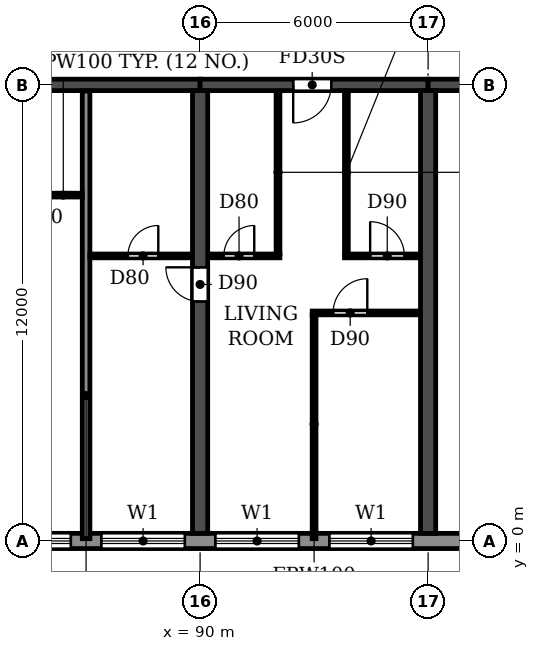
"""IFC4 building model, lengths in metres.
Left out: names, types, materials, properties, quantities, classifications, styles, units other than length and angle.
Written with IfcOpenShell. Run it as: python <this file> out.ifc"""

import sys

from ifc_helpers import new_model, si_unit, direction, frame, frame_2d, origin, place, context, subcontext, project, spatial, rectangle, extrude, element, fill, save


model = new_model("IFC4")
c1 = context("Model", 3, precision=1e-05, world=origin(), true_north=direction((0.0, 1.0)))
c2 = subcontext(c1, "Body", "Model", "MODEL_VIEW")
j1 = project(units=[si_unit("LENGTHUNIT", "METRE"), si_unit("PLANEANGLEUNIT", "RADIAN")], contexts=[c1])
p1 = place(None, origin())
s1 = spatial("IfcSite", under=j1, at=p1, CompositionType="ELEMENT")
p2 = place(p1, origin())
s2 = spatial("IfcBuilding", under=s1, at=p2, CompositionType="ELEMENT")
p3 = place(p2, frame((0.0, 0.0, 23.4)))
s3 = spatial("IfcBuildingStorey", under=s2, at=p3, CompositionType="ELEMENT", Elevation=23.4)
p4 = place(p3, frame((90.0, 0.2, 0.0), z_axis=(0.0, 0.0, 1.0), x_axis=(0.0, 1.0, 0.0)))
e1 = element("IfcWall", 1, at=p4, inside=s3, PredefinedType="SHEAR", context=c2, shape_type="SweptSolid", body=[
    extrude(rectangle(XDim=11.65, YDim=0.4, at=frame_2d((5.825, 0.0))), origin(), (0.0, 0.0, 1.0), 3.05),
])
p5 = place(p4, frame((6.1, 0.0, 0.0)))
e2 = element("IfcOpeningElement", 2, at=p5, cuts=e1, PredefinedType="OPENING", context=c2, shape_type="SweptSolid", body=[
    extrude(rectangle(XDim=0.9, YDim=2.1, at=frame_2d((0.45, 1.05))), frame((0.0, 0.21, 0.0), z_axis=(0.0, -1.0, 0.0), x_axis=(1.0, 0.0, 0.0)), (0.0, 0.0, 1.0), 0.42),
])
p6 = place(p3, frame((96.0, 0.2, 0.0), z_axis=(0.0, 0.0, 1.0), x_axis=(0.0, 1.0, 0.0)))
e3 = element("IfcWall", 3, at=p6, inside=s3, PredefinedType="SHEAR", context=c2, shape_type="SweptSolid", body=[
    extrude(rectangle(XDim=11.65, YDim=0.4, at=frame_2d((5.825, 0.0))), origin(), (0.0, 0.0, 1.0), 3.05),
])
p7 = place(p3, frame((84.0, 12.0, 0.0), z_axis=(0.0, 0.0, 1.0), x_axis=(1.0, 0.0, 0.0)))
e4 = element("IfcWall", 4, at=p7, inside=s3, PredefinedType="SHEAR", context=c2, shape_type="SweptSolid", body=[
    extrude(rectangle(XDim=6.0, YDim=0.3, at=frame_2d((3.0, 0.0))), origin(), (0.0, 0.0, 1.0), 2.45),
])
p8 = place(p3, frame((90.0, 12.0, 0.0), z_axis=(0.0, 0.0, 1.0), x_axis=(1.0, 0.0, 0.0)))
e5 = element("IfcWall", 5, at=p8, inside=s3, PredefinedType="SHEAR", context=c2, shape_type="SweptSolid", body=[
    extrude(rectangle(XDim=6.0, YDim=0.3, at=frame_2d((3.0, 0.0))), origin(), (0.0, 0.0, 1.0), 2.45),
])
p9 = place(p8, frame((2.45, 0.0, 0.0)))
e6 = element("IfcOpeningElement", 6, at=p9, cuts=e5, PredefinedType="OPENING", context=c2, shape_type="SweptSolid", body=[
    extrude(rectangle(XDim=1.0, YDim=2.1, at=frame_2d((0.5, 1.05))), frame((0.0, 0.16, 0.0), z_axis=(0.0, -1.0, 0.0), x_axis=(1.0, 0.0, 0.0)), (0.0, 0.0, 1.0), 0.32),
])
p10 = place(p3, frame((96.0, 12.0, 0.0), z_axis=(0.0, 0.0, 1.0), x_axis=(1.0, 0.0, 0.0)))
e7 = element("IfcWall", 7, at=p10, inside=s3, PredefinedType="SHEAR", context=c2, shape_type="SweptSolid", body=[
    extrude(rectangle(XDim=5.8, YDim=0.3, at=frame_2d((2.9, 0.0))), origin(), (0.0, 0.0, 1.0), 2.45),
])
p11 = place(p10, frame((2.5, 0.0, 0.0)))
e8 = element("IfcOpeningElement", 8, at=p11, cuts=e7, PredefinedType="OPENING", context=c2, shape_type="SweptSolid", body=[
    extrude(rectangle(XDim=1.0, YDim=2.1, at=frame_2d((0.5, 1.05))), frame((0.0, 0.16, 0.0), z_axis=(0.0, -1.0, 0.0), x_axis=(1.0, 0.0, 0.0)), (0.0, 0.0, 1.0), 0.32),
])
p12 = place(p3, frame((4.683, 0.0, 0.0), z_axis=(0.0, 0.0, 1.0), x_axis=(1.0, 0.0, 0.0)))
e9 = element("IfcWall", 9, at=p12, inside=s3, PredefinedType="STANDARD", context=c2, shape_type="SweptSolid", body=[
    extrude(rectangle(XDim=92.634, YDim=0.4, at=frame_2d((46.317, 0.0))), origin(), (0.0, 0.0, 1.0), 3.05),
])
p13 = place(p12, frame((1.717, 0.0, 0.9)))
e10 = element("IfcOpeningElement", 10, at=p13, cuts=e9, PredefinedType="OPENING", context=c2, shape_type="SweptSolid", body=[
    extrude(rectangle(XDim=2.2, YDim=1.5, at=frame_2d((1.1, 0.75))), frame((0.0, 0.21, 0.0), z_axis=(0.0, -1.0, 0.0), x_axis=(1.0, 0.0, 0.0)), (0.0, 0.0, 1.0), 0.42),
])
p14 = place(p12, frame((4.717, 0.0, 0.9)))
e11 = element("IfcOpeningElement", 11, at=p14, cuts=e9, PredefinedType="OPENING", context=c2, shape_type="SweptSolid", body=[
    extrude(rectangle(XDim=2.2, YDim=1.5, at=frame_2d((1.1, 0.75))), frame((0.0, 0.21, 0.0), z_axis=(0.0, -1.0, 0.0), x_axis=(1.0, 0.0, 0.0)), (0.0, 0.0, 1.0), 0.42),
])
p15 = place(p12, frame((7.717, 0.0, 0.9)))
e12 = element("IfcOpeningElement", 12, at=p15, cuts=e9, PredefinedType="OPENING", context=c2, shape_type="SweptSolid", body=[
    extrude(rectangle(XDim=2.2, YDim=1.5, at=frame_2d((1.1, 0.75))), frame((0.0, 0.21, 0.0), z_axis=(0.0, -1.0, 0.0), x_axis=(1.0, 0.0, 0.0)), (0.0, 0.0, 1.0), 0.42),
])
p16 = place(p12, frame((10.717, 0.0, 0.9)))
e13 = element("IfcOpeningElement", 13, at=p16, cuts=e9, PredefinedType="OPENING", context=c2, shape_type="SweptSolid", body=[
    extrude(rectangle(XDim=2.2, YDim=1.5, at=frame_2d((1.1, 0.75))), frame((0.0, 0.21, 0.0), z_axis=(0.0, -1.0, 0.0), x_axis=(1.0, 0.0, 0.0)), (0.0, 0.0, 1.0), 0.42),
])
p17 = place(p12, frame((13.717, 0.0, 0.9)))
e14 = element("IfcOpeningElement", 14, at=p17, cuts=e9, PredefinedType="OPENING", context=c2, shape_type="SweptSolid", body=[
    extrude(rectangle(XDim=2.2, YDim=1.5, at=frame_2d((1.1, 0.75))), frame((0.0, 0.21, 0.0), z_axis=(0.0, -1.0, 0.0), x_axis=(1.0, 0.0, 0.0)), (0.0, 0.0, 1.0), 0.42),
])
p18 = place(p12, frame((16.717, 0.0, 0.9)))
e15 = element("IfcOpeningElement", 15, at=p18, cuts=e9, PredefinedType="OPENING", context=c2, shape_type="SweptSolid", body=[
    extrude(rectangle(XDim=2.2, YDim=1.5, at=frame_2d((1.1, 0.75))), frame((0.0, 0.21, 0.0), z_axis=(0.0, -1.0, 0.0), x_axis=(1.0, 0.0, 0.0)), (0.0, 0.0, 1.0), 0.42),
])
p19 = place(p12, frame((19.917, 0.0, 0.0)))
e16 = element("IfcOpeningElement", 16, at=p19, cuts=e9, PredefinedType="OPENING", context=c2, shape_type="SweptSolid", body=[
    extrude(rectangle(XDim=1.8, YDim=2.4, at=frame_2d((0.9, 1.2))), frame((0.0, 0.21, 0.0), z_axis=(0.0, -1.0, 0.0), x_axis=(1.0, 0.0, 0.0)), (0.0, 0.0, 1.0), 0.42),
])
p20 = place(p12, frame((22.717, 0.0, 0.9)))
e17 = element("IfcOpeningElement", 17, at=p20, cuts=e9, PredefinedType="OPENING", context=c2, shape_type="SweptSolid", body=[
    extrude(rectangle(XDim=2.2, YDim=1.5, at=frame_2d((1.1, 0.75))), frame((0.0, 0.21, 0.0), z_axis=(0.0, -1.0, 0.0), x_axis=(1.0, 0.0, 0.0)), (0.0, 0.0, 1.0), 0.42),
])
p21 = place(p12, frame((25.717, 0.0, 0.9)))
e18 = element("IfcOpeningElement", 18, at=p21, cuts=e9, PredefinedType="OPENING", context=c2, shape_type="SweptSolid", body=[
    extrude(rectangle(XDim=2.2, YDim=1.5, at=frame_2d((1.1, 0.75))), frame((0.0, 0.21, 0.0), z_axis=(0.0, -1.0, 0.0), x_axis=(1.0, 0.0, 0.0)), (0.0, 0.0, 1.0), 0.42),
])
p22 = place(p12, frame((28.717, 0.0, 0.9)))
e19 = element("IfcOpeningElement", 19, at=p22, cuts=e9, PredefinedType="OPENING", context=c2, shape_type="SweptSolid", body=[
    extrude(rectangle(XDim=2.2, YDim=1.5, at=frame_2d((1.1, 0.75))), frame((0.0, 0.21, 0.0), z_axis=(0.0, -1.0, 0.0), x_axis=(1.0, 0.0, 0.0)), (0.0, 0.0, 1.0), 0.42),
])
p23 = place(p12, frame((31.917, 0.0, 0.0)))
e20 = element("IfcOpeningElement", 20, at=p23, cuts=e9, PredefinedType="OPENING", context=c2, shape_type="SweptSolid", body=[
    extrude(rectangle(XDim=1.8, YDim=2.4, at=frame_2d((0.9, 1.2))), frame((0.0, 0.21, 0.0), z_axis=(0.0, -1.0, 0.0), x_axis=(1.0, 0.0, 0.0)), (0.0, 0.0, 1.0), 0.42),
])
p24 = place(p12, frame((34.717, 0.0, 0.9)))
e21 = element("IfcOpeningElement", 21, at=p24, cuts=e9, PredefinedType="OPENING", context=c2, shape_type="SweptSolid", body=[
    extrude(rectangle(XDim=2.2, YDim=1.5, at=frame_2d((1.1, 0.75))), frame((0.0, 0.21, 0.0), z_axis=(0.0, -1.0, 0.0), x_axis=(1.0, 0.0, 0.0)), (0.0, 0.0, 1.0), 0.42),
])
p25 = place(p12, frame((37.717, 0.0, 0.9)))
e22 = element("IfcOpeningElement", 22, at=p25, cuts=e9, PredefinedType="OPENING", context=c2, shape_type="SweptSolid", body=[
    extrude(rectangle(XDim=2.2, YDim=1.5, at=frame_2d((1.1, 0.75))), frame((0.0, 0.21, 0.0), z_axis=(0.0, -1.0, 0.0), x_axis=(1.0, 0.0, 0.0)), (0.0, 0.0, 1.0), 0.42),
])
p26 = place(p12, frame((40.717, 0.0, 0.9)))
e23 = element("IfcOpeningElement", 23, at=p26, cuts=e9, PredefinedType="OPENING", context=c2, shape_type="SweptSolid", body=[
    extrude(rectangle(XDim=2.2, YDim=1.5, at=frame_2d((1.1, 0.75))), frame((0.0, 0.21, 0.0), z_axis=(0.0, -1.0, 0.0), x_axis=(1.0, 0.0, 0.0)), (0.0, 0.0, 1.0), 0.42),
])
p27 = place(p12, frame((43.917, 0.0, 0.0)))
e24 = element("IfcOpeningElement", 24, at=p27, cuts=e9, PredefinedType="OPENING", context=c2, shape_type="SweptSolid", body=[
    extrude(rectangle(XDim=1.8, YDim=2.4, at=frame_2d((0.9, 1.2))), frame((0.0, 0.21, 0.0), z_axis=(0.0, -1.0, 0.0), x_axis=(1.0, 0.0, 0.0)), (0.0, 0.0, 1.0), 0.42),
])
p28 = place(p12, frame((46.717, 0.0, 0.9)))
e25 = element("IfcOpeningElement", 25, at=p28, cuts=e9, PredefinedType="OPENING", context=c2, shape_type="SweptSolid", body=[
    extrude(rectangle(XDim=2.2, YDim=1.5, at=frame_2d((1.1, 0.75))), frame((0.0, 0.21, 0.0), z_axis=(0.0, -1.0, 0.0), x_axis=(1.0, 0.0, 0.0)), (0.0, 0.0, 1.0), 0.42),
])
p29 = place(p12, frame((49.717, 0.0, 0.9)))
e26 = element("IfcOpeningElement", 26, at=p29, cuts=e9, PredefinedType="OPENING", context=c2, shape_type="SweptSolid", body=[
    extrude(rectangle(XDim=2.2, YDim=1.5, at=frame_2d((1.1, 0.75))), frame((0.0, 0.21, 0.0), z_axis=(0.0, -1.0, 0.0), x_axis=(1.0, 0.0, 0.0)), (0.0, 0.0, 1.0), 0.42),
])
p30 = place(p12, frame((52.717, 0.0, 0.9)))
e27 = element("IfcOpeningElement", 27, at=p30, cuts=e9, PredefinedType="OPENING", context=c2, shape_type="SweptSolid", body=[
    extrude(rectangle(XDim=2.2, YDim=1.5, at=frame_2d((1.1, 0.75))), frame((0.0, 0.21, 0.0), z_axis=(0.0, -1.0, 0.0), x_axis=(1.0, 0.0, 0.0)), (0.0, 0.0, 1.0), 0.42),
])
p31 = place(p12, frame((55.717, 0.0, 0.9)))
e28 = element("IfcOpeningElement", 28, at=p31, cuts=e9, PredefinedType="OPENING", context=c2, shape_type="SweptSolid", body=[
    extrude(rectangle(XDim=2.2, YDim=1.5, at=frame_2d((1.1, 0.75))), frame((0.0, 0.21, 0.0), z_axis=(0.0, -1.0, 0.0), x_axis=(1.0, 0.0, 0.0)), (0.0, 0.0, 1.0), 0.42),
])
p32 = place(p12, frame((58.917, 0.0, 0.0)))
e29 = element("IfcOpeningElement", 29, at=p32, cuts=e9, PredefinedType="OPENING", context=c2, shape_type="SweptSolid", body=[
    extrude(rectangle(XDim=1.8, YDim=2.4, at=frame_2d((0.9, 1.2))), frame((0.0, 0.21, 0.0), z_axis=(0.0, -1.0, 0.0), x_axis=(1.0, 0.0, 0.0)), (0.0, 0.0, 1.0), 0.42),
])
p33 = place(p12, frame((61.717, 0.0, 0.9)))
e30 = element("IfcOpeningElement", 30, at=p33, cuts=e9, PredefinedType="OPENING", context=c2, shape_type="SweptSolid", body=[
    extrude(rectangle(XDim=2.2, YDim=1.5, at=frame_2d((1.1, 0.75))), frame((0.0, 0.21, 0.0), z_axis=(0.0, -1.0, 0.0), x_axis=(1.0, 0.0, 0.0)), (0.0, 0.0, 1.0), 0.42),
])
p34 = place(p12, frame((64.717, 0.0, 0.9)))
e31 = element("IfcOpeningElement", 31, at=p34, cuts=e9, PredefinedType="OPENING", context=c2, shape_type="SweptSolid", body=[
    extrude(rectangle(XDim=2.2, YDim=1.5, at=frame_2d((1.1, 0.75))), frame((0.0, 0.21, 0.0), z_axis=(0.0, -1.0, 0.0), x_axis=(1.0, 0.0, 0.0)), (0.0, 0.0, 1.0), 0.42),
])
p35 = place(p12, frame((67.717, 0.0, 0.9)))
e32 = element("IfcOpeningElement", 32, at=p35, cuts=e9, PredefinedType="OPENING", context=c2, shape_type="SweptSolid", body=[
    extrude(rectangle(XDim=2.2, YDim=1.5, at=frame_2d((1.1, 0.75))), frame((0.0, 0.21, 0.0), z_axis=(0.0, -1.0, 0.0), x_axis=(1.0, 0.0, 0.0)), (0.0, 0.0, 1.0), 0.42),
])
p36 = place(p12, frame((70.917, 0.0, 0.0)))
e33 = element("IfcOpeningElement", 33, at=p36, cuts=e9, PredefinedType="OPENING", context=c2, shape_type="SweptSolid", body=[
    extrude(rectangle(XDim=1.8, YDim=2.4, at=frame_2d((0.9, 1.2))), frame((0.0, 0.21, 0.0), z_axis=(0.0, -1.0, 0.0), x_axis=(1.0, 0.0, 0.0)), (0.0, 0.0, 1.0), 0.42),
])
p37 = place(p12, frame((73.717, 0.0, 0.9)))
e34 = element("IfcOpeningElement", 34, at=p37, cuts=e9, PredefinedType="OPENING", context=c2, shape_type="SweptSolid", body=[
    extrude(rectangle(XDim=2.2, YDim=1.5, at=frame_2d((1.1, 0.75))), frame((0.0, 0.21, 0.0), z_axis=(0.0, -1.0, 0.0), x_axis=(1.0, 0.0, 0.0)), (0.0, 0.0, 1.0), 0.42),
])
p38 = place(p12, frame((76.717, 0.0, 0.9)))
e35 = element("IfcOpeningElement", 35, at=p38, cuts=e9, PredefinedType="OPENING", context=c2, shape_type="SweptSolid", body=[
    extrude(rectangle(XDim=2.2, YDim=1.5, at=frame_2d((1.1, 0.75))), frame((0.0, 0.21, 0.0), z_axis=(0.0, -1.0, 0.0), x_axis=(1.0, 0.0, 0.0)), (0.0, 0.0, 1.0), 0.42),
])
p39 = place(p12, frame((79.717, 0.0, 0.9)))
e36 = element("IfcOpeningElement", 36, at=p39, cuts=e9, PredefinedType="OPENING", context=c2, shape_type="SweptSolid", body=[
    extrude(rectangle(XDim=2.2, YDim=1.5, at=frame_2d((1.1, 0.75))), frame((0.0, 0.21, 0.0), z_axis=(0.0, -1.0, 0.0), x_axis=(1.0, 0.0, 0.0)), (0.0, 0.0, 1.0), 0.42),
])
p40 = place(p12, frame((82.717, 0.0, 0.9)))
e37 = element("IfcOpeningElement", 37, at=p40, cuts=e9, PredefinedType="OPENING", context=c2, shape_type="SweptSolid", body=[
    extrude(rectangle(XDim=2.2, YDim=1.5, at=frame_2d((1.1, 0.75))), frame((0.0, 0.21, 0.0), z_axis=(0.0, -1.0, 0.0), x_axis=(1.0, 0.0, 0.0)), (0.0, 0.0, 1.0), 0.42),
])
p41 = place(p12, frame((85.717, 0.0, 0.9)))
e38 = element("IfcOpeningElement", 38, at=p41, cuts=e9, PredefinedType="OPENING", context=c2, shape_type="SweptSolid", body=[
    extrude(rectangle(XDim=2.2, YDim=1.5, at=frame_2d((1.1, 0.75))), frame((0.0, 0.21, 0.0), z_axis=(0.0, -1.0, 0.0), x_axis=(1.0, 0.0, 0.0)), (0.0, 0.0, 1.0), 0.42),
])
p42 = place(p12, frame((88.717, 0.0, 0.9)))
e39 = element("IfcOpeningElement", 39, at=p42, cuts=e9, PredefinedType="OPENING", context=c2, shape_type="SweptSolid", body=[
    extrude(rectangle(XDim=2.2, YDim=1.5, at=frame_2d((1.1, 0.75))), frame((0.0, 0.21, 0.0), z_axis=(0.0, -1.0, 0.0), x_axis=(1.0, 0.0, 0.0)), (0.0, 0.0, 1.0), 0.42),
])
p43 = place(p3, frame((87.0, 0.06, 0.0), z_axis=(0.0, 0.0, 1.0), x_axis=(0.0, 1.0, 0.0)))
e40 = element("IfcWall", 40, at=p43, inside=s3, PredefinedType="PARTITIONING", context=c2, shape_type="SweptSolid", body=[
    extrude(rectangle(XDim=11.78, YDim=0.2, at=frame_2d((5.89, 0.0))), origin(), (0.0, 0.0, 1.0), 3.05),
])
p44 = place(p3, frame((92.95, 6.0, 0.0), z_axis=(0.0, 0.0, 1.0), x_axis=(1.0, 0.0, 0.0)))
e41 = element("IfcWall", 41, at=p44, inside=s3, PredefinedType="PARTITIONING", context=c2, shape_type="SweptSolid", body=[
    extrude(rectangle(XDim=2.84, YDim=0.1, at=frame_2d((1.42, 0.0))), origin(), (0.0, 0.0, 1.0), 3.05),
])
p45 = place(p44, frame((0.55, 0.0, 0.0)))
e42 = element("IfcOpeningElement", 42, at=p45, cuts=e41, PredefinedType="OPENING", context=c2, shape_type="SweptSolid", body=[
    extrude(rectangle(XDim=0.9, YDim=2.1, at=frame_2d((0.45, 1.05))), frame((0.0, 0.06, 0.0), z_axis=(0.0, -1.0, 0.0), x_axis=(1.0, 0.0, 0.0)), (0.0, 0.0, 1.0), 0.12),
])
p46 = place(p3, frame((87.1, 7.5, 0.0), z_axis=(0.0, 0.0, 1.0), x_axis=(1.0, 0.0, 0.0)))
e43 = element("IfcWall", 43, at=p46, inside=s3, PredefinedType="PARTITIONING", context=c2, shape_type="SweptSolid", body=[
    extrude(rectangle(XDim=2.69, YDim=0.1, at=frame_2d((1.345, 0.0))), origin(), (0.0, 0.0, 1.0), 3.05),
])
p47 = place(p46, frame((1.0, 0.0, 0.0)))
e44 = element("IfcOpeningElement", 44, at=p47, cuts=e43, PredefinedType="OPENING", context=c2, shape_type="SweptSolid", body=[
    extrude(rectangle(XDim=0.8, YDim=2.1, at=frame_2d((0.4, 1.05))), frame((0.0, 0.06, 0.0), z_axis=(0.0, -1.0, 0.0), x_axis=(1.0, 0.0, 0.0)), (0.0, 0.0, 1.0), 0.12),
])
p48 = place(p3, frame((90.21, 7.5, 0.0), z_axis=(0.0, 0.0, 1.0), x_axis=(1.0, 0.0, 0.0)))
e45 = element("IfcWall", 45, at=p48, inside=s3, PredefinedType="PARTITIONING", context=c2, shape_type="SweptSolid", body=[
    extrude(rectangle(XDim=1.89, YDim=0.1, at=frame_2d((0.945, 0.0))), origin(), (0.0, 0.0, 1.0), 3.05),
])
p49 = place(p48, frame((0.415, 0.0, 0.0)))
e46 = element("IfcOpeningElement", 46, at=p49, cuts=e45, PredefinedType="OPENING", context=c2, shape_type="SweptSolid", body=[
    extrude(rectangle(XDim=0.8, YDim=2.1, at=frame_2d((0.4, 1.05))), frame((0.0, 0.06, 0.0), z_axis=(0.0, -1.0, 0.0), x_axis=(1.0, 0.0, 0.0)), (0.0, 0.0, 1.0), 0.12),
])
p50 = place(p3, frame((93.8, 7.5, 0.0), z_axis=(0.0, 0.0, 1.0), x_axis=(1.0, 0.0, 0.0)))
e47 = element("IfcWall", 47, at=p50, inside=s3, PredefinedType="PARTITIONING", context=c2, shape_type="SweptSolid", body=[
    extrude(rectangle(XDim=1.99, YDim=0.1, at=frame_2d((0.995, 0.0))), origin(), (0.0, 0.0, 1.0), 3.05),
])
p51 = place(p50, frame((0.675, 0.0, 0.0)))
e48 = element("IfcOpeningElement", 48, at=p51, cuts=e47, PredefinedType="OPENING", context=c2, shape_type="SweptSolid", body=[
    extrude(rectangle(XDim=0.9, YDim=2.1, at=frame_2d((0.45, 1.05))), frame((0.0, 0.06, 0.0), z_axis=(0.0, -1.0, 0.0), x_axis=(1.0, 0.0, 0.0)), (0.0, 0.0, 1.0), 0.12),
])
p52 = place(p3, frame((84.21, 9.1, 0.0), z_axis=(0.0, 0.0, 1.0), x_axis=(1.0, 0.0, 0.0)))
e49 = element("IfcWall", 49, at=p52, inside=s3, PredefinedType="PARTITIONING", context=c2, shape_type="SweptSolid", body=[
    extrude(rectangle(XDim=2.69, YDim=0.1, at=frame_2d((1.345, 0.0))), origin(), (0.0, 0.0, 1.0), 3.05),
])
p53 = place(p52, frame((0.89, 0.0, 0.0)))
e50 = element("IfcOpeningElement", 50, at=p53, cuts=e49, PredefinedType="OPENING", context=c2, shape_type="SweptSolid", body=[
    extrude(rectangle(XDim=0.8, YDim=2.1, at=frame_2d((0.4, 1.05))), frame((0.0, 0.06, 0.0), z_axis=(0.0, -1.0, 0.0), x_axis=(1.0, 0.0, 0.0)), (0.0, 0.0, 1.0), 0.12),
])
p54 = place(p3, frame((92.05, 7.55, 0.0), z_axis=(0.0, 0.0, 1.0), x_axis=(0.0, 1.0, 0.0)))
e51 = element("IfcWall", 51, at=p54, inside=s3, PredefinedType="PARTITIONING", context=c2, shape_type="SweptSolid", body=[
    extrude(rectangle(XDim=4.29, YDim=0.1, at=frame_2d((2.145, 0.0))), origin(), (0.0, 0.0, 1.0), 3.05),
])
p55 = place(p3, frame((93.0, 0.06, 0.0), z_axis=(0.0, 0.0, 1.0), x_axis=(0.0, 1.0, 0.0)))
e52 = element("IfcWall", 52, at=p55, inside=s3, PredefinedType="PARTITIONING", context=c2, shape_type="SweptSolid", body=[
    extrude(rectangle(XDim=5.89, YDim=0.1, at=frame_2d((2.945, 0.0))), origin(), (0.0, 0.0, 1.0), 3.05),
])
p56 = place(p3, frame((93.85, 7.55, 0.0), z_axis=(0.0, 0.0, 1.0), x_axis=(0.0, 1.0, 0.0)))
e53 = element("IfcWall", 53, at=p56, inside=s3, PredefinedType="PARTITIONING", context=c2, shape_type="SweptSolid", body=[
    extrude(rectangle(XDim=4.29, YDim=0.1, at=frame_2d((2.145, 0.0))), origin(), (0.0, 0.0, 1.0), 3.05),
])
p57 = place(p39, origin())
e54 = element("IfcWindow", 54, at=p57, inside=s3, PartitioningType="DOUBLE_PANEL_HORIZONTAL", PredefinedType="WINDOW", context=c2, shape_type="SweptSolid", body=[
    extrude(rectangle(XDim=2.2, YDim=1.5, at=frame_2d((1.1, 0.75))), frame((0.0, 0.03, 0.0), z_axis=(0.0, -1.0, 0.0), x_axis=(1.0, 0.0, 0.0)), (0.0, 0.0, 1.0), 0.06),
])
fill(e36, e54)
p58 = place(p40, origin())
e55 = element("IfcWindow", 55, at=p58, inside=s3, PartitioningType="DOUBLE_PANEL_HORIZONTAL", PredefinedType="WINDOW", context=c2, shape_type="SweptSolid", body=[
    extrude(rectangle(XDim=2.2, YDim=1.5, at=frame_2d((1.1, 0.75))), frame((0.0, 0.03, 0.0), z_axis=(0.0, -1.0, 0.0), x_axis=(1.0, 0.0, 0.0)), (0.0, 0.0, 1.0), 0.06),
])
fill(e37, e55)
p59 = place(p41, origin())
e56 = element("IfcWindow", 56, at=p59, inside=s3, PartitioningType="DOUBLE_PANEL_HORIZONTAL", PredefinedType="WINDOW", context=c2, shape_type="SweptSolid", body=[
    extrude(rectangle(XDim=2.2, YDim=1.5, at=frame_2d((1.1, 0.75))), frame((0.0, 0.03, 0.0), z_axis=(0.0, -1.0, 0.0), x_axis=(1.0, 0.0, 0.0)), (0.0, 0.0, 1.0), 0.06),
])
fill(e38, e56)
p60 = place(p42, origin())
e57 = element("IfcWindow", 57, at=p60, inside=s3, PartitioningType="DOUBLE_PANEL_HORIZONTAL", PredefinedType="WINDOW", context=c2, shape_type="SweptSolid", body=[
    extrude(rectangle(XDim=2.2, YDim=1.5, at=frame_2d((1.1, 0.75))), frame((0.0, 0.03, 0.0), z_axis=(0.0, -1.0, 0.0), x_axis=(1.0, 0.0, 0.0)), (0.0, 0.0, 1.0), 0.06),
])
fill(e39, e57)
p61 = place(p47, origin())
e58 = element("IfcDoor", 58, at=p61, inside=s3, OperationType="SINGLE_SWING_RIGHT", PredefinedType="DOOR", context=c2, shape_type="SweptSolid", body=[
    extrude(rectangle(XDim=0.8, YDim=2.1, at=frame_2d((0.4, 1.05))), frame((0.0, 0.025, 0.0), z_axis=(0.0, -1.0, 0.0), x_axis=(1.0, 0.0, 0.0)), (0.0, 0.0, 1.0), 0.05),
])
fill(e44, e58)
p62 = place(p5, origin())
e59 = element("IfcDoor", 59, at=p62, inside=s3, OperationType="SINGLE_SWING_RIGHT", PredefinedType="DOOR", context=c2, shape_type="SweptSolid", body=[
    extrude(rectangle(XDim=0.9, YDim=2.1, at=frame_2d((0.45, 1.05))), frame((0.0, 0.025, 0.0), z_axis=(0.0, -1.0, 0.0), x_axis=(1.0, 0.0, 0.0)), (0.0, 0.0, 1.0), 0.05),
])
fill(e2, e59)
p63 = place(p49, origin())
e60 = element("IfcDoor", 60, at=p63, inside=s3, OperationType="SINGLE_SWING_RIGHT", PredefinedType="DOOR", context=c2, shape_type="SweptSolid", body=[
    extrude(rectangle(XDim=0.8, YDim=2.1, at=frame_2d((0.4, 1.05))), frame((0.0, 0.025, 0.0), z_axis=(0.0, -1.0, 0.0), x_axis=(1.0, 0.0, 0.0)), (0.0, 0.0, 1.0), 0.05),
])
fill(e46, e60)
p64 = place(p9, frame((1.0, 0.0, 0.0), z_axis=(0.0, 0.0, 1.0), x_axis=(-1.0, 0.0, 0.0)))
e61 = element("IfcDoor", 61, at=p64, inside=s3, OperationType="SINGLE_SWING_RIGHT", PredefinedType="DOOR", context=c2, shape_type="SweptSolid", body=[
    extrude(rectangle(XDim=1.0, YDim=2.1, at=frame_2d((0.5, 1.05))), frame((0.0, 0.025, 0.0), z_axis=(0.0, -1.0, 0.0), x_axis=(1.0, 0.0, 0.0)), (0.0, 0.0, 1.0), 0.05),
])
fill(e6, e61)
p65 = place(p45, origin())
e62 = element("IfcDoor", 62, at=p65, inside=s3, OperationType="SINGLE_SWING_RIGHT", PredefinedType="DOOR", context=c2, shape_type="SweptSolid", body=[
    extrude(rectangle(XDim=0.9, YDim=2.1, at=frame_2d((0.45, 1.05))), frame((0.0, 0.025, 0.0), z_axis=(0.0, -1.0, 0.0), x_axis=(1.0, 0.0, 0.0)), (0.0, 0.0, 1.0), 0.05),
])
fill(e42, e62)
p66 = place(p51, origin())
e63 = element("IfcDoor", 63, at=p66, inside=s3, OperationType="SINGLE_SWING_LEFT", PredefinedType="DOOR", context=c2, shape_type="SweptSolid", body=[
    extrude(rectangle(XDim=0.9, YDim=2.1, at=frame_2d((0.45, 1.05))), frame((0.0, 0.025, 0.0), z_axis=(0.0, -1.0, 0.0), x_axis=(1.0, 0.0, 0.0)), (0.0, 0.0, 1.0), 0.05),
])
fill(e48, e63)
save(model, sys.argv[1])
